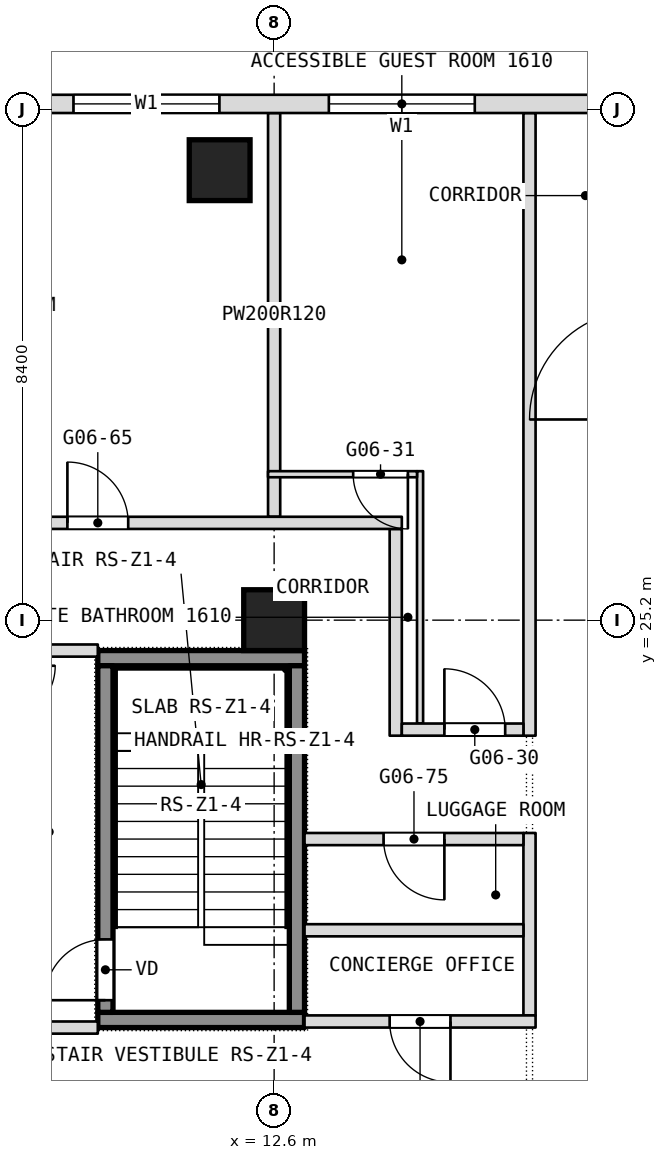
"""IFC4 building model, lengths in metres.
Left out: names, types, materials, properties, quantities, classifications, styles, units other than length and angle.
Written with IfcOpenShell. Run it as: python <this file> out.ifc"""

import sys

from ifc_helpers import new_model, si_unit, direction, frame, frame_2d, origin, origin_2d, place, context, subcontext, project, spatial, rectangle, extrude, element, fill, save


model = new_model("IFC4")
c1 = context("Model", 3, precision=1e-05, world=origin(), true_north=direction((0.0, 1.0)))
c2 = subcontext(c1, "Body", "Model", "MODEL_VIEW")
j1 = project(units=[si_unit("LENGTHUNIT", "METRE"), si_unit("PLANEANGLEUNIT", "RADIAN")], contexts=[c1])
p1 = place(None, origin())
s1 = spatial("IfcSite", under=j1, at=p1, CompositionType="ELEMENT")
p2 = place(p1, origin())
s2 = spatial("IfcBuilding", under=s1, at=p2, CompositionType="ELEMENT")
p3 = place(p2, frame((0.0, 0.0, 72.5)))
s3 = spatial("IfcBuildingStorey", under=s2, at=p3, CompositionType="ELEMENT", Elevation=72.5)
for number, where, z_axis, x_axis in (
    (1, (12.6, 25.2, 0.0), (0.0, 0.0, 1.0), (1.0, 0.0, 0.0)),
    (2, (11.704, 32.6, 0.0), (0.0, 0.0, 1.0), (1.0, 0.0, 0.0)),
):
    element("IfcColumn", number, at=place(p3, frame(where, z_axis=z_axis, x_axis=x_axis)), inside=s3, PredefinedType="COLUMN", context=c2, shape_type="SweptSolid", body=[
        extrude(rectangle(XDim=1.0, YDim=1.0, at=origin_2d()), origin(), (0.0, 0.0, 1.0), 3.6),
    ])
p4 = place(p3, frame((16.8, 18.7, 0.0), z_axis=(0.0, 0.0, 1.0), x_axis=(0.0, 1.0, 0.0)))
e3 = element("IfcWall", 3, at=p4, inside=s3, PredefinedType="PARTITIONING", context=c2, shape_type="SweptSolid", body=[
    extrude(rectangle(XDim=3.0, YDim=0.2, at=frame_2d((1.5, 0.0))), origin(), (0.0, 0.0, 1.0), 3.34),
])
p5 = place(p3, frame((16.8, 23.3, 0.0), z_axis=(0.0, 0.0, 1.0), x_axis=(0.0, 1.0, 0.0)))
e4 = element("IfcWall", 4, at=p5, inside=s3, PredefinedType="PARTITIONING", context=c2, shape_type="SweptSolid", body=[
    extrude(rectangle(XDim=10.24, YDim=0.2, at=frame_2d((5.12, 0.0))), origin(), (0.0, 0.0, 1.0), 3.34),
])
p6 = place(p3, frame((15.0, 23.5, 0.0), z_axis=(0.0, 0.0, 1.0), x_axis=(0.0, 1.0, 0.0)))
e5 = element("IfcWall", 5, at=p6, inside=s3, PredefinedType="PARTITIONING", context=c2, shape_type="SweptSolid", body=[
    extrude(rectangle(XDim=4.15, YDim=0.1, at=frame_2d((2.075, 0.0))), origin(), (0.0, 0.0, 1.0), 3.34),
])
p7 = place(p3, frame((14.6, 23.3, 0.0), z_axis=(0.0, 0.0, 1.0), x_axis=(0.0, 1.0, 0.0)))
e6 = element("IfcWall", 6, at=p7, inside=s3, PredefinedType="PARTITIONING", context=c2, shape_type="SweptSolid", body=[
    extrude(rectangle(XDim=3.4, YDim=0.2, at=frame_2d((1.7, 0.0))), origin(), (0.0, 0.0, 1.0), 3.34),
])
p8 = place(p3, frame((12.6, 26.9, 0.0), z_axis=(0.0, 0.0, 1.0), x_axis=(0.0, 1.0, 0.0)))
e7 = element("IfcWall", 7, at=p8, inside=s3, PredefinedType="PARTITIONING", context=c2, shape_type="SweptSolid", body=[
    extrude(rectangle(XDim=6.64, YDim=0.2, at=frame_2d((3.32, 0.0))), origin(), (0.0, 0.0, 1.0), 3.34),
])
p9 = place(p3, frame((8.1, 18.5, 0.0), z_axis=(0.0, 0.0, 1.0), x_axis=(1.0, 0.0, 0.0)))
e8 = element("IfcWall", 8, at=p9, inside=s3, PredefinedType="PARTITIONING", context=c2, shape_type="SweptSolid", body=[
    extrude(rectangle(XDim=1.6, YDim=0.2, at=frame_2d((0.8, 0.0))), origin(), (0.0, 0.0, 1.0), 3.34),
])
p10 = place(p3, frame((13.1, 18.6, 0.0), z_axis=(0.0, 0.0, 1.0), x_axis=(1.0, 0.0, 0.0)))
e9 = element("IfcWall", 9, at=p10, inside=s3, PredefinedType="PARTITIONING", context=c2, shape_type="SweptSolid", body=[
    extrude(rectangle(XDim=3.8, YDim=0.2, at=frame_2d((1.9, 0.0))), origin(), (0.0, 0.0, 1.0), 3.34),
])
p11 = place(p10, frame((1.4, 0.0, 0.0)))
e10 = element("IfcOpeningElement", 10, at=p11, cuts=e9, PredefinedType="OPENING", context=c2, shape_type="SweptSolid", body=[
    extrude(rectangle(XDim=1.0, YDim=2.1, at=frame_2d((0.5, 1.05))), frame((0.0, 0.1, 0.0), z_axis=(0.0, -1.0, 0.0), x_axis=(1.0, 0.0, 0.0)), (0.0, 0.0, 1.0), 0.2),
])
p12 = place(p3, frame((13.1, 20.1, 0.0), z_axis=(0.0, 0.0, 1.0), x_axis=(1.0, 0.0, 0.0)))
e11 = element("IfcWall", 11, at=p12, inside=s3, PredefinedType="PARTITIONING", context=c2, shape_type="SweptSolid", body=[
    extrude(rectangle(XDim=3.6, YDim=0.2, at=frame_2d((1.8, 0.0))), origin(), (0.0, 0.0, 1.0), 3.34),
])
p13 = place(p3, frame((13.1, 21.6, 0.0), z_axis=(0.0, 0.0, 1.0), x_axis=(1.0, 0.0, 0.0)))
e12 = element("IfcWall", 12, at=p13, inside=s3, PredefinedType="PARTITIONING", context=c2, shape_type="SweptSolid", body=[
    extrude(rectangle(XDim=3.6, YDim=0.2, at=frame_2d((1.8, 0.0))), origin(), (0.0, 0.0, 1.0), 3.34),
])
p14 = place(p13, frame((1.3, 0.0, 0.0)))
e13 = element("IfcOpeningElement", 13, at=p14, cuts=e12, PredefinedType="OPENING", context=c2, shape_type="SweptSolid", body=[
    extrude(rectangle(XDim=1.0, YDim=2.1, at=frame_2d((0.5, 1.05))), frame((0.0, 0.1, 0.0), z_axis=(0.0, -1.0, 0.0), x_axis=(1.0, 0.0, 0.0)), (0.0, 0.0, 1.0), 0.2),
])
p15 = place(p3, frame((14.7, 23.4, 0.0), z_axis=(0.0, 0.0, 1.0), x_axis=(1.0, 0.0, 0.0)))
e14 = element("IfcWall", 14, at=p15, inside=s3, PredefinedType="PARTITIONING", context=c2, shape_type="SweptSolid", body=[
    extrude(rectangle(XDim=2.0, YDim=0.2, at=frame_2d((1.0, 0.0))), origin(), (0.0, 0.0, 1.0), 3.34),
])
p16 = place(p15, frame((0.7, 0.0, 0.0)))
e15 = element("IfcOpeningElement", 15, at=p16, cuts=e14, PredefinedType="OPENING", context=c2, shape_type="SweptSolid", body=[
    extrude(rectangle(XDim=1.0, YDim=2.1, at=frame_2d((0.5, 1.05))), frame((0.0, 0.1, 0.0), z_axis=(0.0, -1.0, 0.0), x_axis=(1.0, 0.0, 0.0)), (0.0, 0.0, 1.0), 0.2),
])
p17 = place(p3, frame((8.0, 24.7, 0.0), z_axis=(0.0, 0.0, 1.0), x_axis=(1.0, 0.0, 0.0)))
e16 = element("IfcWall", 16, at=p17, inside=s3, PredefinedType="PARTITIONING", context=c2, shape_type="SweptSolid", body=[
    extrude(rectangle(XDim=1.7, YDim=0.2, at=frame_2d((0.85, 0.0))), origin(), (0.0, 0.0, 1.0), 3.34),
])
p18 = place(p3, frame((6.7, 26.8, 0.0), z_axis=(0.0, 0.0, 1.0), x_axis=(1.0, 0.0, 0.0)))
e17 = element("IfcWall", 17, at=p18, inside=s3, PredefinedType="PARTITIONING", context=c2, shape_type="SweptSolid", body=[
    extrude(rectangle(XDim=8.0, YDim=0.2, at=frame_2d((4.0, 0.0))), origin(), (0.0, 0.0, 1.0), 3.34),
])
p19 = place(p18, frame((2.5, 0.0, 0.0)))
e18 = element("IfcOpeningElement", 18, at=p19, cuts=e17, PredefinedType="OPENING", context=c2, shape_type="SweptSolid", body=[
    extrude(rectangle(XDim=1.0, YDim=2.1, at=frame_2d((0.5, 1.05))), frame((0.0, 0.1, 0.0), z_axis=(0.0, -1.0, 0.0), x_axis=(1.0, 0.0, 0.0)), (0.0, 0.0, 1.0), 0.2),
])
p20 = place(p3, frame((12.5, 27.6, 0.0), z_axis=(0.0, 0.0, 1.0), x_axis=(1.0, 0.0, 0.0)))
e19 = element("IfcWall", 19, at=p20, inside=s3, PredefinedType="PARTITIONING", context=c2, shape_type="SweptSolid", body=[
    extrude(rectangle(XDim=2.45, YDim=0.1, at=frame_2d((1.225, 0.0))), origin(), (0.0, 0.0, 1.0), 3.34),
])
p21 = place(p20, frame((1.4, 0.0, 0.0)))
e20 = element("IfcOpeningElement", 20, at=p21, cuts=e19, PredefinedType="OPENING", context=c2, shape_type="SweptSolid", body=[
    extrude(rectangle(XDim=0.9, YDim=2.1, at=frame_2d((0.45, 1.05))), frame((0.0, 0.05, 0.0), z_axis=(0.0, -1.0, 0.0), x_axis=(1.0, 0.0, 0.0)), (0.0, 0.0, 1.0), 0.1),
])
p22 = place(p3, frame((23.406, 33.69, 0.0), z_axis=(0.0, 0.0, 1.0), x_axis=(-1.0, 0.0, 0.0)))
e21 = element("IfcWall", 21, at=p22, inside=s3, PredefinedType="NOTDEFINED", context=c2, shape_type="SweptSolid", body=[
    extrude(rectangle(XDim=46.812, YDim=0.3, at=frame_2d((23.406, 0.0))), origin(), (0.0, 0.0, 1.0), 3.6),
])
p23 = place(p22, frame((2.186, 0.0, 0.9)))
e22 = element("IfcOpeningElement", 22, at=p23, cuts=e21, PredefinedType="OPENING", context=c2, shape_type="SweptSolid", body=[
    extrude(rectangle(XDim=2.4, YDim=2.1, at=frame_2d((1.2, 1.05))), frame((0.0, 0.15, 0.0), z_axis=(0.0, -1.0, 0.0), x_axis=(1.0, 0.0, 0.0)), (0.0, 0.0, 1.0), 0.3),
])
p24 = place(p22, frame((7.506, 0.0, 0.9)))
e23 = element("IfcOpeningElement", 23, at=p24, cuts=e21, PredefinedType="OPENING", context=c2, shape_type="SweptSolid", body=[
    extrude(rectangle(XDim=2.4, YDim=2.1, at=frame_2d((1.2, 1.05))), frame((0.0, 0.15, 0.0), z_axis=(0.0, -1.0, 0.0), x_axis=(1.0, 0.0, 0.0)), (0.0, 0.0, 1.0), 0.3),
])
p25 = place(p22, frame((11.706, 0.0, 0.9)))
e24 = element("IfcOpeningElement", 24, at=p25, cuts=e21, PredefinedType="OPENING", context=c2, shape_type="SweptSolid", body=[
    extrude(rectangle(XDim=2.4, YDim=2.1, at=frame_2d((1.2, 1.05))), frame((0.0, 0.15, 0.0), z_axis=(0.0, -1.0, 0.0), x_axis=(1.0, 0.0, 0.0)), (0.0, 0.0, 1.0), 0.3),
])
p26 = place(p22, frame((15.906, 0.0, 0.9)))
e25 = element("IfcOpeningElement", 25, at=p26, cuts=e21, PredefinedType="OPENING", context=c2, shape_type="SweptSolid", body=[
    extrude(rectangle(XDim=2.4, YDim=2.1, at=frame_2d((1.2, 1.05))), frame((0.0, 0.15, 0.0), z_axis=(0.0, -1.0, 0.0), x_axis=(1.0, 0.0, 0.0)), (0.0, 0.0, 1.0), 0.3),
])
p27 = place(p22, frame((20.106, 0.0, 0.9)))
e26 = element("IfcOpeningElement", 26, at=p27, cuts=e21, PredefinedType="OPENING", context=c2, shape_type="SweptSolid", body=[
    extrude(rectangle(XDim=2.4, YDim=2.1, at=frame_2d((1.2, 1.05))), frame((0.0, 0.15, 0.0), z_axis=(0.0, -1.0, 0.0), x_axis=(1.0, 0.0, 0.0)), (0.0, 0.0, 1.0), 0.3),
])
p28 = place(p22, frame((24.306, 0.0, 0.9)))
e27 = element("IfcOpeningElement", 27, at=p28, cuts=e21, PredefinedType="OPENING", context=c2, shape_type="SweptSolid", body=[
    extrude(rectangle(XDim=2.4, YDim=2.1, at=frame_2d((1.2, 1.05))), frame((0.0, 0.15, 0.0), z_axis=(0.0, -1.0, 0.0), x_axis=(1.0, 0.0, 0.0)), (0.0, 0.0, 1.0), 0.3),
])
p29 = place(p22, frame((28.506, 0.0, 0.9)))
e28 = element("IfcOpeningElement", 28, at=p29, cuts=e21, PredefinedType="OPENING", context=c2, shape_type="SweptSolid", body=[
    extrude(rectangle(XDim=2.4, YDim=2.1, at=frame_2d((1.2, 1.05))), frame((0.0, 0.15, 0.0), z_axis=(0.0, -1.0, 0.0), x_axis=(1.0, 0.0, 0.0)), (0.0, 0.0, 1.0), 0.3),
])
p30 = place(p22, frame((32.706, 0.0, 0.9)))
e29 = element("IfcOpeningElement", 29, at=p30, cuts=e21, PredefinedType="OPENING", context=c2, shape_type="SweptSolid", body=[
    extrude(rectangle(XDim=2.4, YDim=2.1, at=frame_2d((1.2, 1.05))), frame((0.0, 0.15, 0.0), z_axis=(0.0, -1.0, 0.0), x_axis=(1.0, 0.0, 0.0)), (0.0, 0.0, 1.0), 0.3),
])
p31 = place(p22, frame((36.906, 0.0, 0.9)))
e30 = element("IfcOpeningElement", 30, at=p31, cuts=e21, PredefinedType="OPENING", context=c2, shape_type="SweptSolid", body=[
    extrude(rectangle(XDim=2.4, YDim=2.1, at=frame_2d((1.2, 1.05))), frame((0.0, 0.15, 0.0), z_axis=(0.0, -1.0, 0.0), x_axis=(1.0, 0.0, 0.0)), (0.0, 0.0, 1.0), 0.3),
])
p32 = place(p22, frame((42.226, 0.0, 0.9)))
e31 = element("IfcOpeningElement", 31, at=p32, cuts=e21, PredefinedType="OPENING", context=c2, shape_type="SweptSolid", body=[
    extrude(rectangle(XDim=2.4, YDim=2.1, at=frame_2d((1.2, 1.05))), frame((0.0, 0.15, 0.0), z_axis=(0.0, -1.0, 0.0), x_axis=(1.0, 0.0, 0.0)), (0.0, 0.0, 1.0), 0.3),
])
for number, where, z_axis, x_axis in (
    (32, (9.7, 18.625, 0.1), (0.0, 0.0, 1.0), (1.0, 0.0, 0.0)),
    (33, (9.7, 24.575, 0.1), (0.0, 0.0, 1.0), (1.0, 0.0, 0.0)),
):
    element("IfcWall", number, at=place(p3, frame(where, z_axis=z_axis, x_axis=x_axis)), inside=s3, PredefinedType="SHEAR", context=c2, shape_type="SweptSolid", body=[
        extrude(rectangle(XDim=3.4, YDim=0.25, at=frame_2d((1.7, 0.0))), origin(), (0.0, 0.0, 1.0), 3.6),
    ])
p33 = place(p3, frame((9.825, 18.75, 0.1), z_axis=(0.0, 0.0, 1.0), x_axis=(0.0, 1.0, 0.0)))
e34 = element("IfcWall", 34, at=p33, inside=s3, PredefinedType="SHEAR", context=c2, shape_type="SweptSolid", body=[
    extrude(rectangle(XDim=5.7, YDim=0.25, at=frame_2d((2.85, 0.0))), origin(), (0.0, 0.0, 1.0), 3.6),
])
p34 = place(p33, frame((0.2, 0.0, 0.0)))
e35 = element("IfcOpeningElement", 35, at=p34, cuts=e34, PredefinedType="OPENING", context=c2, shape_type="SweptSolid", body=[
    extrude(rectangle(XDim=1.0, YDim=2.1, at=frame_2d((0.5, 1.05))), frame((0.0, 0.125, 0.0), z_axis=(0.0, -1.0, 0.0), x_axis=(1.0, 0.0, 0.0)), (0.0, 0.0, 1.0), 0.25),
])
p35 = place(p3, frame((12.975, 18.75, 0.1), z_axis=(0.0, 0.0, 1.0), x_axis=(0.0, 1.0, 0.0)))
e36 = element("IfcWall", 36, at=p35, inside=s3, PredefinedType="SHEAR", context=c2, shape_type="SweptSolid", body=[
    extrude(rectangle(XDim=5.7, YDim=0.25, at=frame_2d((2.85, 0.0))), origin(), (0.0, 0.0, 1.0), 3.6),
])
p36 = place(p11, origin())
e37 = element("IfcDoor", 37, at=p36, inside=s3, OperationType="SINGLE_SWING_LEFT", PredefinedType="DOOR", context=c2, shape_type="SweptSolid", body=[
    extrude(rectangle(XDim=1.0, YDim=2.1, at=frame_2d((0.5, 1.05))), frame((0.0, 0.025, 0.0), z_axis=(0.0, -1.0, 0.0), x_axis=(1.0, 0.0, 0.0)), (0.0, 0.0, 1.0), 0.05),
])
fill(e10, e37)
p37 = place(p14, origin())
e38 = element("IfcDoor", 38, at=p37, inside=s3, OperationType="SINGLE_SWING_RIGHT", PredefinedType="DOOR", context=c2, shape_type="SweptSolid", body=[
    extrude(rectangle(XDim=1.0, YDim=2.1, at=frame_2d((0.5, 1.05))), frame((0.0, 0.025, 0.0), z_axis=(0.0, -1.0, 0.0), x_axis=(1.0, 0.0, 0.0)), (0.0, 0.0, 1.0), 0.05),
])
fill(e13, e38)
p38 = place(p16, origin())
e39 = element("IfcDoor", 39, at=p38, inside=s3, OperationType="SINGLE_SWING_RIGHT", PredefinedType="DOOR", context=c2, shape_type="SweptSolid", body=[
    extrude(rectangle(XDim=1.0, YDim=2.1, at=frame_2d((0.5, 1.05))), frame((0.0, 0.025, 0.0), z_axis=(0.0, -1.0, 0.0), x_axis=(1.0, 0.0, 0.0)), (0.0, 0.0, 1.0), 0.05),
])
fill(e15, e39)
p39 = place(p19, origin())
e40 = element("IfcDoor", 40, at=p39, inside=s3, OperationType="SINGLE_SWING_LEFT", PredefinedType="DOOR", context=c2, shape_type="SweptSolid", body=[
    extrude(rectangle(XDim=1.0, YDim=2.1, at=frame_2d((0.5, 1.05))), frame((0.0, 0.025, 0.0), z_axis=(0.0, -1.0, 0.0), x_axis=(1.0, 0.0, 0.0)), (0.0, 0.0, 1.0), 0.05),
])
fill(e18, e40)
p40 = place(p21, origin())
e41 = element("IfcDoor", 41, at=p40, inside=s3, OperationType="SINGLE_SWING_LEFT", PredefinedType="DOOR", context=c2, shape_type="SweptSolid", body=[
    extrude(rectangle(XDim=0.9, YDim=2.1, at=frame_2d((0.45, 1.05))), frame((0.0, 0.025, 0.0), z_axis=(0.0, -1.0, 0.0), x_axis=(1.0, 0.0, 0.0)), (0.0, 0.0, 1.0), 0.05),
])
fill(e20, e41)
p41 = place(p24, origin())
e42 = element("IfcWindow", 42, at=p41, inside=s3, PartitioningType="SINGLE_PANEL", PredefinedType="WINDOW", context=c2, shape_type="SweptSolid", body=[
    extrude(rectangle(XDim=2.4, YDim=2.1, at=frame_2d((1.2, 1.05))), frame((0.0, 0.03, 0.0), z_axis=(0.0, -1.0, 0.0), x_axis=(1.0, 0.0, 0.0)), (0.0, 0.0, 1.0), 0.06),
])
fill(e23, e42)
p42 = place(p25, origin())
e43 = element("IfcWindow", 43, at=p42, inside=s3, PartitioningType="SINGLE_PANEL", PredefinedType="WINDOW", context=c2, shape_type="SweptSolid", body=[
    extrude(rectangle(XDim=2.4, YDim=2.1, at=frame_2d((1.2, 1.05))), frame((0.0, 0.03, 0.0), z_axis=(0.0, -1.0, 0.0), x_axis=(1.0, 0.0, 0.0)), (0.0, 0.0, 1.0), 0.06),
])
fill(e24, e43)
p43 = place(p34, origin())
e44 = element("IfcDoor", 44, at=p43, inside=s3, OperationType="SINGLE_SWING_LEFT", PredefinedType="DOOR", context=c2, shape_type="SweptSolid", body=[
    extrude(rectangle(XDim=1.0, YDim=2.1, at=frame_2d((0.5, 1.05))), frame((0.0, 0.025, 0.0), z_axis=(0.0, -1.0, 0.0), x_axis=(1.0, 0.0, 0.0)), (0.0, 0.0, 1.0), 0.05),
])
fill(e35, e44)
save(model, sys.argv[1])
